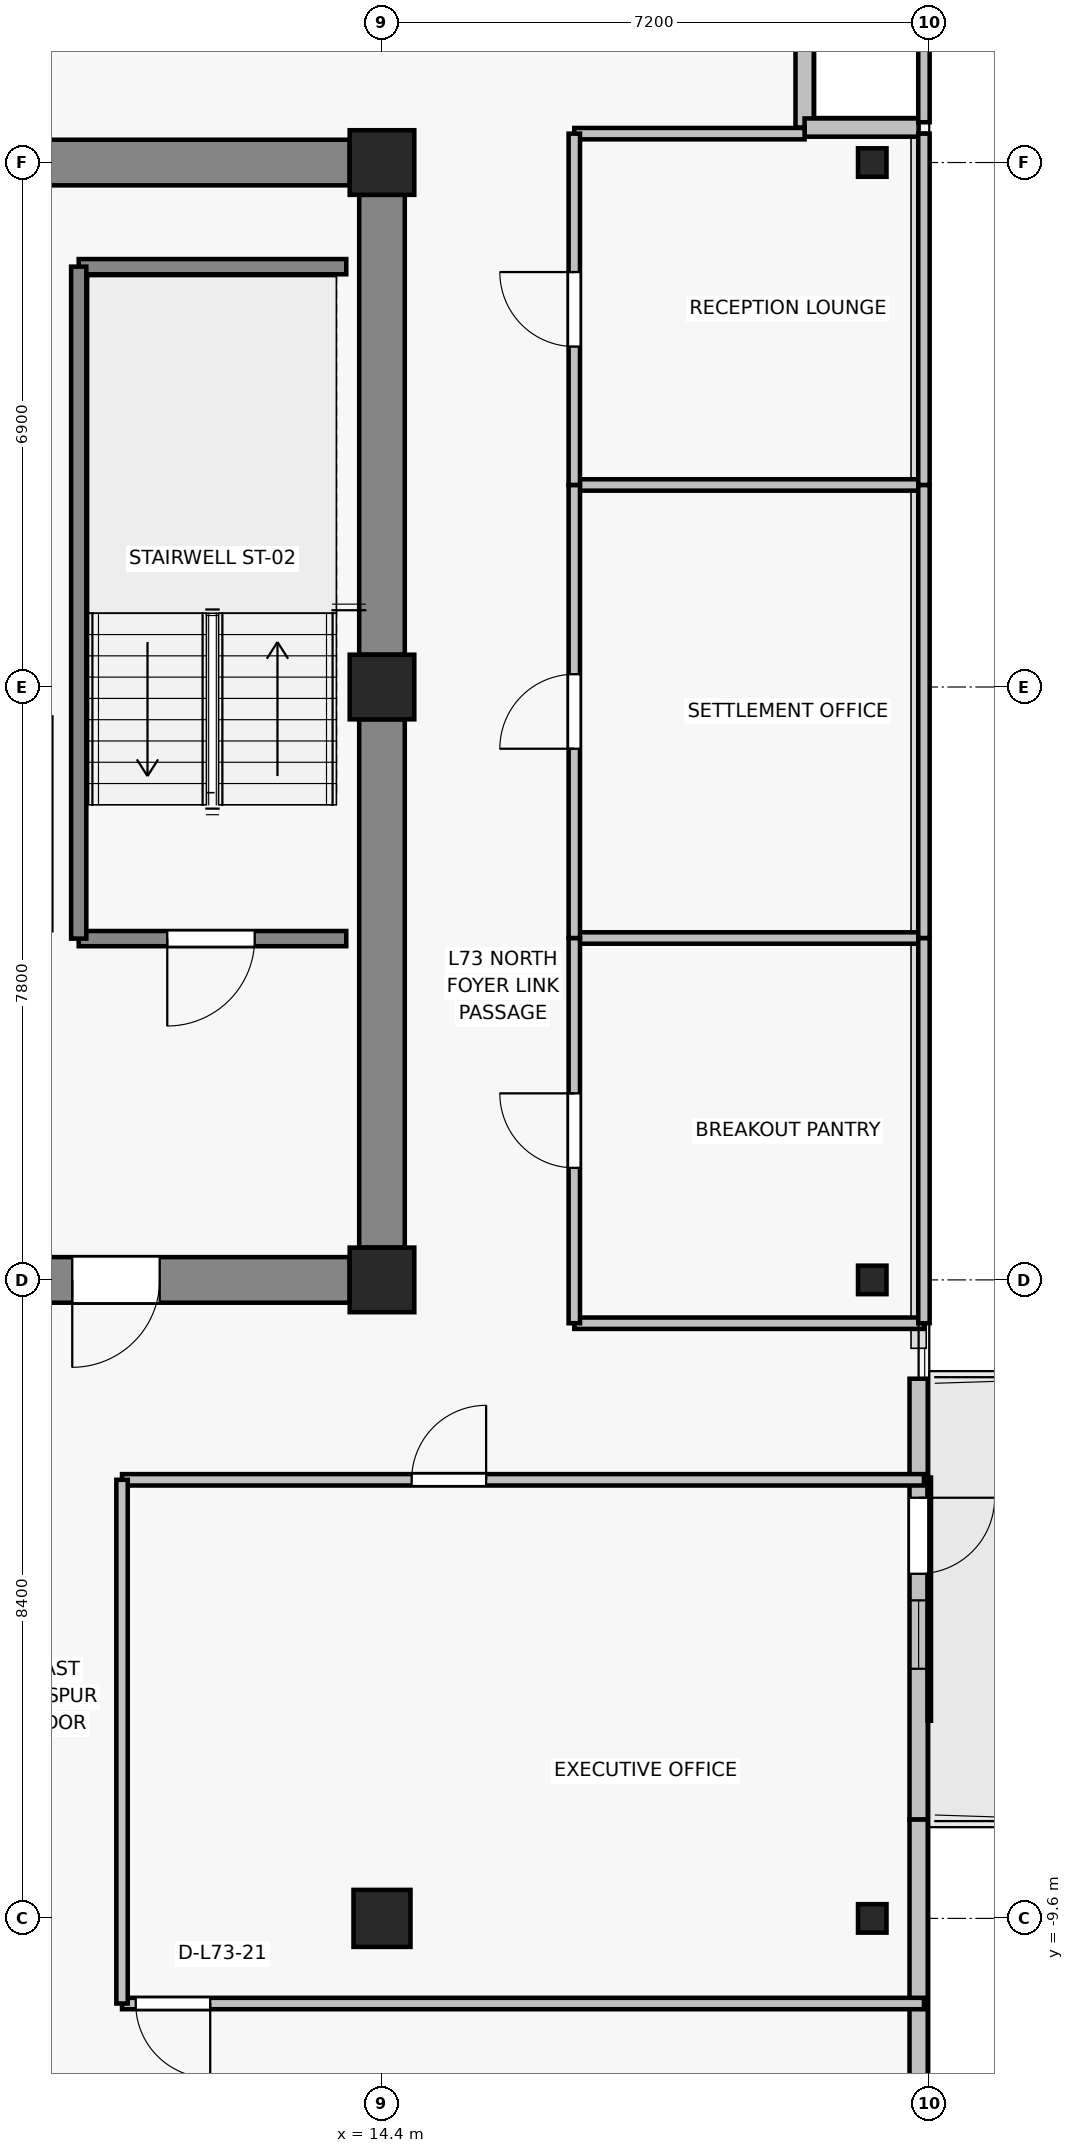
"""IFC4 building model, lengths in metres.
Left out: names, types, materials, properties, quantities, classifications, styles, units other than length and angle.
Written with IfcOpenShell. Run it as: python <this file> out.ifc"""

import sys

from ifc_helpers import new_model, si_unit, direction, frame, frame_2d, origin, origin_2d, place, context, subcontext, project, spatial, rectangle, i_section, extrude, source, transform, mapped, element, fill, save


model = new_model("IFC4")
c1 = context("Model", 3, precision=1e-05, world=origin(), true_north=direction((0.0, 1.0)))
c2 = subcontext(c1, "Body", "Model", "MODEL_VIEW")
j1 = project(units=[si_unit("LENGTHUNIT", "METRE"), si_unit("PLANEANGLEUNIT", "RADIAN")], contexts=[c1])
p1 = place(None, origin())
s1 = spatial("IfcSite", under=j1, at=p1, CompositionType="ELEMENT")
p2 = place(p1, origin())
s2 = spatial("IfcBuilding", under=s1, at=p2, CompositionType="ELEMENT")
p3 = place(p2, frame((0.0, 0.0, 258.4)))
s3 = spatial("IfcBuildingStorey", under=s2, at=p3, CompositionType="ELEMENT", Elevation=258.4)
for number, where, z_axis, x_axis in (
    (1, (14.4, -1.2, 0.0), (0.0, 0.0, 1.0), (1.0, 0.0, 0.0)),
    (2, (14.4, 6.6, 0.0), (0.0, 0.0, 1.0), (1.0, 0.0, 0.0)),
    (3, (14.4, 13.5, 0.0), (0.0, 0.0, 1.0), (1.0, 0.0, 0.0)),
):
    element("IfcColumn", number, at=place(p3, frame(where, z_axis=z_axis, x_axis=x_axis)), inside=s3, PredefinedType="COLUMN", context=c2, shape_type="SweptSolid", body=[
        extrude(rectangle(XDim=0.85, YDim=0.85, at=origin_2d()), origin(), (0.0, 0.0, 1.0), 3.3),
    ])
p4 = place(p3, frame((14.4, -9.6, 0.0), z_axis=(0.0, 0.0, 1.0), x_axis=(1.0, 0.0, 0.0)))
e4 = element("IfcColumn", 4, at=p4, inside=s3, PredefinedType="COLUMN", context=c2, shape_type="SweptSolid", body=[
    extrude(rectangle(XDim=0.75, YDim=0.75, at=origin_2d()), origin(), (0.0, 0.0, 1.0), 3.3),
])
for number, where, z_axis, x_axis in (
    (5, (20.85, -9.6, 0.0), (0.0, 0.0, 1.0), (1.0, 0.0, 0.0)),
    (6, (20.85, -1.2, 0.0), (0.0, 0.0, 1.0), (1.0, 0.0, 0.0)),
    (7, (20.85, 13.5, 0.0), (0.0, 0.0, 1.0), (1.0, 0.0, 0.0)),
):
    element("IfcColumn", number, at=place(p3, frame(where, z_axis=z_axis, x_axis=x_axis)), inside=s3, PredefinedType="COLUMN", context=c2, shape_type="SweptSolid", body=[
        extrude(i_section(OverallWidth=0.375, OverallDepth=0.375, WebThickness=0.017, FlangeThickness=0.027, FilletRadius=0.015, at=origin_2d()), origin(), (0.0, 0.0, 1.0), 3.3),
    ])
p5 = place(p3, frame((7.625, 13.5, 0.0), z_axis=(0.0, 0.0, 1.0), x_axis=(1.0, 0.0, 0.0)))
e8 = element("IfcWall", 8, at=p5, inside=s3, PredefinedType="SHEAR", context=c2, shape_type="SweptSolid", body=[
    extrude(rectangle(XDim=6.35, YDim=0.6, at=frame_2d((3.175, 0.0))), origin(), (0.0, 0.0, 1.0), 3.075),
])
p6 = place(p3, frame((14.4, -0.775, 0.0), z_axis=(0.0, 0.0, 1.0), x_axis=(0.0, 1.0, 0.0)))
e9 = element("IfcWall", 9, at=p6, inside=s3, PredefinedType="SHEAR", context=c2, shape_type="SweptSolid", body=[
    extrude(rectangle(XDim=6.95, YDim=0.6, at=frame_2d((3.475, 0.0))), origin(), (0.0, 0.0, 1.0), 3.075),
])
p7 = place(p3, frame((14.4, 7.025, 0.0), z_axis=(0.0, 0.0, 1.0), x_axis=(0.0, 1.0, 0.0)))
e10 = element("IfcWall", 10, at=p7, inside=s3, PredefinedType="SHEAR", context=c2, shape_type="SweptSolid", body=[
    extrude(rectangle(XDim=6.05, YDim=0.6, at=frame_2d((3.025, 0.0))), origin(), (0.0, 0.0, 1.0), 3.075),
])
p8 = place(p3, frame((13.975, -1.2, 0.0), z_axis=(0.0, 0.0, 1.0), x_axis=(-1.0, 0.0, 0.0)))
e11 = element("IfcWall", 11, at=p8, inside=s3, PredefinedType="SHEAR", context=c2, shape_type="SweptSolid", body=[
    extrude(rectangle(XDim=6.35, YDim=0.6, at=frame_2d((3.175, 0.0))), origin(), (0.0, 0.0, 1.0), 3.075),
])
p9 = place(p8, frame((2.5, 0.0, 0.0)))
e12 = element("IfcOpeningElement", 12, at=p9, cuts=e11, PredefinedType="OPENING", context=c2, shape_type="SweptSolid", body=[
    extrude(rectangle(XDim=1.15, YDim=2.15, at=frame_2d((0.575, 1.075))), frame((0.0, 0.31, 0.0), z_axis=(0.0, -1.0, 0.0), x_axis=(1.0, 0.0, 0.0)), (0.0, 0.0, 1.0), 0.62),
])
p10 = place(p3, frame((21.46, -2.5, 0.0), z_axis=(0.0, 0.0, 1.0), x_axis=(0.0, -1.0, 0.0)))
e13 = element("IfcWall", 13, at=p10, inside=s3, PredefinedType="SOLIDWALL", context=c2, shape_type="SweptSolid", body=[
    extrude(rectangle(XDim=5.8, YDim=0.24, at=frame_2d((2.9, 0.0))), origin(), (0.0, 0.0, 1.0), 3.075),
])
p11 = place(p10, frame((1.566, 0.0, 0.0)))
e14 = element("IfcOpeningElement", 14, at=p11, cuts=e13, PredefinedType="OPENING", context=c2, shape_type="SweptSolid", body=[
    extrude(rectangle(XDim=1.0, YDim=2.2, at=frame_2d((0.5, 1.1))), frame((0.0, 0.13, 0.0), z_axis=(0.0, -1.0, 0.0), x_axis=(1.0, 0.0, 0.0)), (0.0, 0.0, 1.0), 0.26),
])
p12 = place(p10, frame((2.916, 0.0, 0.85)))
e15 = element("IfcOpeningElement", 15, at=p12, cuts=e13, PredefinedType="OPENING", context=c2, shape_type="SweptSolid", body=[
    extrude(rectangle(XDim=0.9, YDim=1.35, at=frame_2d((0.45, 0.675))), frame((0.0, 0.13, 0.0), z_axis=(0.0, -1.0, 0.0), x_axis=(1.0, 0.0, 0.0)), (0.0, 0.0, 1.0), 0.26),
])
for number, where, z_axis, x_axis in (
    (16, (19.96, 13.96, 0.0), (0.0, 0.0, 1.0), (0.0, 1.0, 0.0)),
    (17, (21.46, 13.96, 0.0), (0.0, 0.0, 1.0), (-1.0, 0.0, 0.0)),
):
    element("IfcWall", number, at=place(p3, frame(where, z_axis=z_axis, x_axis=x_axis)), inside=s3, PredefinedType="SOLIDWALL", context=c2, shape_type="SweptSolid", body=[
        extrude(rectangle(XDim=1.5, YDim=0.24, at=frame_2d((0.75, 0.0))), origin(), (0.0, 0.0, 1.0), 3.075),
    ])
p13 = place(p3, frame((21.46, -13.96, 0.0), z_axis=(0.0, 0.0, 1.0), x_axis=(0.0, 1.0, 0.0)))
e18 = element("IfcWall", 18, at=p13, inside=s3, PredefinedType="SOLIDWALL", context=c2, shape_type="SweptSolid", body=[
    extrude(rectangle(XDim=5.66, YDim=0.24, at=frame_2d((2.83, 0.0))), origin(), (0.0, 0.0, 1.0), 3.075),
])
p14 = place(p3, frame((13.93, 3.29, 0.0), z_axis=(0.0, 0.0, 1.0), x_axis=(-1.0, 0.0, 0.0)))
e19 = element("IfcWall", 19, at=p14, inside=s3, PredefinedType="SOLIDWALL", context=c2, shape_type="SweptSolid", body=[
    extrude(rectangle(XDim=3.52, YDim=0.2, at=frame_2d((1.76, 0.0))), origin(), (0.0, 0.0, 1.0), 3.075),
])
p15 = place(p14, frame((1.205, 0.0, 0.0)))
e20 = element("IfcOpeningElement", 20, at=p15, cuts=e19, PredefinedType="OPENING", context=c2, shape_type="SweptSolid", body=[
    extrude(rectangle(XDim=1.15, YDim=2.15, at=frame_2d((0.575, 1.075))), frame((0.0, 0.11, 0.0), z_axis=(0.0, -1.0, 0.0), x_axis=(1.0, 0.0, 0.0)), (0.0, 0.0, 1.0), 0.22),
])
p16 = place(p3, frame((10.41, 12.13, 0.0), z_axis=(0.0, 0.0, 1.0), x_axis=(1.0, 0.0, 0.0)))
e21 = element("IfcWall", 21, at=p16, inside=s3, PredefinedType="SOLIDWALL", context=c2, shape_type="SweptSolid", body=[
    extrude(rectangle(XDim=3.52, YDim=0.2, at=frame_2d((1.76, 0.0))), origin(), (0.0, 0.0, 1.0), 3.075),
])
p17 = place(p3, frame((10.41, 3.29, 0.0), z_axis=(0.0, 0.0, 1.0), x_axis=(0.0, 1.0, 0.0)))
e22 = element("IfcWall", 22, at=p17, inside=s3, PredefinedType="SOLIDWALL", context=c2, shape_type="SweptSolid", body=[
    extrude(rectangle(XDim=8.84, YDim=0.2, at=frame_2d((4.42, 0.0))), origin(), (0.0, 0.0, 1.0), 3.075),
])
p18 = place(p3, frame((21.53, -10.72, 0.0), z_axis=(0.0, 0.0, 1.0), x_axis=(-1.0, 0.0, 0.0)))
e23 = element("IfcWall", 23, at=p18, inside=s3, PredefinedType="PARTITIONING", context=c2, shape_type="SweptSolid", body=[
    extrude(rectangle(XDim=10.55, YDim=0.15, at=frame_2d((5.275, 0.0))), origin(), (0.0, 0.0, 1.0), 2.615),
])
p19 = place(p18, frame((9.39, 0.0, 0.0)))
e24 = element("IfcOpeningElement", 24, at=p19, cuts=e23, PredefinedType="OPENING", context=c2, shape_type="SweptSolid", body=[
    extrude(rectangle(XDim=0.98, YDim=2.15, at=frame_2d((0.49, 1.075))), frame((0.0, 0.085, 0.0), z_axis=(0.0, -1.0, 0.0), x_axis=(1.0, 0.0, 0.0)), (0.0, 0.0, 1.0), 0.17),
])
p20 = place(p3, frame((10.98, -3.83, 0.0), z_axis=(0.0, 0.0, 1.0), x_axis=(1.0, 0.0, 0.0)))
e25 = element("IfcWall", 25, at=p20, inside=s3, PredefinedType="PARTITIONING", context=c2, shape_type="SweptSolid", body=[
    extrude(rectangle(XDim=10.55, YDim=0.15, at=frame_2d((5.275, 0.0))), origin(), (0.0, 0.0, 1.0), 2.615),
])
p21 = place(p20, frame((3.81, 0.0, 0.0)))
e26 = element("IfcOpeningElement", 26, at=p21, cuts=e25, PredefinedType="OPENING", context=c2, shape_type="SweptSolid", body=[
    extrude(rectangle(XDim=0.98, YDim=2.15, at=frame_2d((0.49, 1.075))), frame((0.0, 0.085, 0.0), z_axis=(0.0, -1.0, 0.0), x_axis=(1.0, 0.0, 0.0)), (0.0, 0.0, 1.0), 0.17),
])
p22 = place(p3, frame((10.98, -10.72, 0.0), z_axis=(0.0, 0.0, 1.0), x_axis=(0.0, 1.0, 0.0)))
e27 = element("IfcWall", 27, at=p22, inside=s3, PredefinedType="PARTITIONING", context=c2, shape_type="SweptSolid", body=[
    extrude(rectangle(XDim=6.89, YDim=0.15, at=frame_2d((3.445, 0.0))), origin(), (0.0, 0.0, 1.0), 2.615),
])
for number, where, z_axis, x_axis in (
    (28, (21.53, -1.77, 0.0), (0.0, 0.0, 1.0), (-1.0, 0.0, 0.0)),
    (29, (16.93, 3.298, 0.0), (0.0, 0.0, 1.0), (1.0, 0.0, 0.0)),
):
    element("IfcWall", number, at=place(p3, frame(where, z_axis=z_axis, x_axis=x_axis)), inside=s3, PredefinedType="PARTITIONING", context=c2, shape_type="SweptSolid", body=[
        extrude(rectangle(XDim=4.6, YDim=0.15, at=frame_2d((2.3, 0.0))), origin(), (0.0, 0.0, 1.0), 2.765),
    ])
p23 = place(p3, frame((16.93, -1.77, 0.0), z_axis=(0.0, 0.0, 1.0), x_axis=(0.0, 1.0, 0.0)))
e30 = element("IfcWall", 30, at=p23, inside=s3, PredefinedType="PARTITIONING", context=c2, shape_type="SweptSolid", body=[
    extrude(rectangle(XDim=5.068, YDim=0.15, at=frame_2d((2.534, 0.0))), origin(), (0.0, 0.0, 1.0), 2.615),
])
p24 = place(p23, frame((2.044, 0.0, 0.0)))
e31 = element("IfcOpeningElement", 31, at=p24, cuts=e30, PredefinedType="OPENING", context=c2, shape_type="SweptSolid", body=[
    extrude(rectangle(XDim=0.98, YDim=2.15, at=frame_2d((0.49, 1.075))), frame((0.0, 0.085, 0.0), z_axis=(0.0, -1.0, 0.0), x_axis=(1.0, 0.0, 0.0)), (0.0, 0.0, 1.0), 0.17),
])
p25 = place(p3, frame((21.53, 3.298, 0.0), z_axis=(0.0, 0.0, 1.0), x_axis=(0.0, -1.0, 0.0)))
e32 = element("IfcWall", 32, at=p25, inside=s3, PredefinedType="PARTITIONING", context=c2, shape_type="SweptSolid", body=[
    extrude(rectangle(XDim=5.068, YDim=0.15, at=frame_2d((2.534, 0.0))), origin(), (0.0, 0.0, 1.0), 3.075),
])
p26 = place(p3, frame((16.93, 9.258, 0.0), z_axis=(0.0, 0.0, 1.0), x_axis=(1.0, 0.0, 0.0)))
e33 = element("IfcWall", 33, at=p26, inside=s3, PredefinedType="PARTITIONING", context=c2, shape_type="SweptSolid", body=[
    extrude(rectangle(XDim=4.6, YDim=0.15, at=frame_2d((2.3, 0.0))), origin(), (0.0, 0.0, 1.0), 2.765),
])
p27 = place(p3, frame((16.93, 3.298, 0.0), z_axis=(0.0, 0.0, 1.0), x_axis=(0.0, 1.0, 0.0)))
e34 = element("IfcWall", 34, at=p27, inside=s3, PredefinedType="PARTITIONING", context=c2, shape_type="SweptSolid", body=[
    extrude(rectangle(XDim=5.96, YDim=0.15, at=frame_2d((2.98, 0.0))), origin(), (0.0, 0.0, 1.0), 3.075),
])
p28 = place(p27, frame((2.49, 0.0, 0.0)))
e35 = element("IfcOpeningElement", 35, at=p28, cuts=e34, PredefinedType="OPENING", context=c2, shape_type="SweptSolid", body=[
    extrude(rectangle(XDim=0.98, YDim=2.15, at=frame_2d((0.49, 1.075))), frame((0.0, 0.085, 0.0), z_axis=(0.0, -1.0, 0.0), x_axis=(1.0, 0.0, 0.0)), (0.0, 0.0, 1.0), 0.17),
])
p29 = place(p3, frame((21.53, 9.258, 0.0), z_axis=(0.0, 0.0, 1.0), x_axis=(0.0, -1.0, 0.0)))
e36 = element("IfcWall", 36, at=p29, inside=s3, PredefinedType="PARTITIONING", context=c2, shape_type="SweptSolid", body=[
    extrude(rectangle(XDim=5.96, YDim=0.15, at=frame_2d((2.98, 0.0))), origin(), (0.0, 0.0, 1.0), 3.075),
])
p30 = place(p3, frame((16.93, 13.88, 0.0), z_axis=(0.0, 0.0, 1.0), x_axis=(1.0, 0.0, 0.0)))
e37 = element("IfcWall", 37, at=p30, inside=s3, PredefinedType="PARTITIONING", context=c2, shape_type="SweptSolid", body=[
    extrude(rectangle(XDim=3.03, YDim=0.15, at=frame_2d((1.515, 0.0))), origin(), (0.0, 0.0, 1.0), 3.075),
])
p31 = place(p3, frame((16.93, 9.258, 0.0), z_axis=(0.0, 0.0, 1.0), x_axis=(0.0, 1.0, 0.0)))
e38 = element("IfcWall", 38, at=p31, inside=s3, PredefinedType="PARTITIONING", context=c2, shape_type="SweptSolid", body=[
    extrude(rectangle(XDim=4.622, YDim=0.15, at=frame_2d((2.311, 0.0))), origin(), (0.0, 0.0, 1.0), 2.615),
])
p32 = place(p31, frame((1.821, 0.0, 0.0)))
e39 = element("IfcOpeningElement", 39, at=p32, cuts=e38, PredefinedType="OPENING", context=c2, shape_type="SweptSolid", body=[
    extrude(rectangle(XDim=0.98, YDim=2.15, at=frame_2d((0.49, 1.075))), frame((0.0, 0.085, 0.0), z_axis=(0.0, -1.0, 0.0), x_axis=(1.0, 0.0, 0.0)), (0.0, 0.0, 1.0), 0.17),
])
p33 = place(p3, frame((21.53, 13.88, 0.0), z_axis=(0.0, 0.0, 1.0), x_axis=(0.0, -1.0, 0.0)))
e40 = element("IfcWall", 40, at=p33, inside=s3, PredefinedType="PARTITIONING", context=c2, shape_type="SweptSolid", body=[
    extrude(rectangle(XDim=4.622, YDim=0.15, at=frame_2d((2.311, 0.0))), origin(), (0.0, 0.0, 1.0), 3.075),
])
p34 = place(p3, frame((21.53, 17.03, 0.0), z_axis=(0.0, 0.0, 1.0), x_axis=(0.0, -1.0, 0.0)))
e41 = element("IfcWall", 41, at=p34, inside=s3, PredefinedType="PARTITIONING", context=c2, shape_type="SweptSolid", body=[
    extrude(rectangle(XDim=3.0, YDim=0.15, at=frame_2d((1.5, 0.0))), origin(), (0.0, 0.0, 1.0), 3.075),
])
m1 = source(origin(), c2, "Body", "SweptSolid", [
    extrude(rectangle(XDim=1.0, YDim=2.2, at=frame_2d((0.5, 1.1))), frame((0.0, 0.025, 0.0), z_axis=(0.0, -1.0, 0.0), x_axis=(1.0, 0.0, 0.0)), (0.0, 0.0, 1.0), 0.05),
])
p35 = place(p11, origin())
e42 = element("IfcDoor", 42, at=p35, inside=s3, OperationType="SINGLE_SWING_LEFT", PredefinedType="DOOR", context=c2, shape_type="MappedRepresentation", body=[
    mapped(m1, transform((0.0, 0.0, 0.0), x_axis=(1.0, 0.0, 0.0), y_axis=(0.0, 1.0, 0.0), z_axis=(0.0, 0.0, 1.0), scale=1.0)),
])
fill(e14, e42)
m2 = source(origin(), c2, "Body", "SweptSolid", [
    extrude(rectangle(XDim=0.9, YDim=1.35, at=frame_2d((0.45, 0.675))), frame((0.0, 0.03, 0.0), z_axis=(0.0, -1.0, 0.0), x_axis=(1.0, 0.0, 0.0)), (0.0, 0.0, 1.0), 0.06),
])
p36 = place(p12, origin())
e43 = element("IfcWindow", 43, at=p36, inside=s3, PartitioningType="SINGLE_PANEL", PredefinedType="WINDOW", context=c2, shape_type="MappedRepresentation", body=[
    mapped(m2, transform((0.0, 0.0, 0.0), x_axis=(1.0, 0.0, 0.0), y_axis=(0.0, 1.0, 0.0), z_axis=(0.0, 0.0, 1.0), scale=1.0)),
])
fill(e15, e43)
m3 = source(origin(), c2, "Body", "SweptSolid", [
    extrude(rectangle(XDim=1.15, YDim=2.15, at=frame_2d((0.575, 1.075))), frame((0.0, 0.025, 0.0), z_axis=(0.0, -1.0, 0.0), x_axis=(1.0, 0.0, 0.0)), (0.0, 0.0, 1.0), 0.05),
])
p37 = place(p15, origin())
e44 = element("IfcDoor", 44, at=p37, inside=s3, OperationType="SINGLE_SWING_RIGHT", PredefinedType="DOOR", context=c2, shape_type="MappedRepresentation", body=[
    mapped(m3, transform((0.0, 0.0, 0.0), x_axis=(1.0, 0.0, 0.0), y_axis=(0.0, 1.0, 0.0), z_axis=(0.0, 0.0, 1.0), scale=1.0)),
])
fill(e20, e44)
p38 = place(p9, origin())
e45 = element("IfcDoor", 45, at=p38, inside=s3, OperationType="SINGLE_SWING_RIGHT", PredefinedType="DOOR", context=c2, shape_type="MappedRepresentation", body=[
    mapped(m3, transform((0.0, 0.0, 0.0), x_axis=(1.0, 0.0, 0.0), y_axis=(0.0, 1.0, 0.0), z_axis=(0.0, 0.0, 1.0), scale=1.0)),
])
fill(e12, e45)
m4 = source(origin(), c2, "Body", "SweptSolid", [
    extrude(rectangle(XDim=0.98, YDim=2.15, at=frame_2d((0.49, 1.075))), frame((0.0, 0.025, 0.0), z_axis=(0.0, -1.0, 0.0), x_axis=(1.0, 0.0, 0.0)), (0.0, 0.0, 1.0), 0.05),
])
p39 = place(p21, origin())
e46 = element("IfcDoor", 46, at=p39, inside=s3, OperationType="SINGLE_SWING_RIGHT", PredefinedType="DOOR", context=c2, shape_type="MappedRepresentation", body=[
    mapped(m4, transform((0.0, 0.0, 0.0), x_axis=(1.0, 0.0, 0.0), y_axis=(0.0, 1.0, 0.0), z_axis=(0.0, 0.0, 1.0), scale=1.0)),
])
fill(e26, e46)
p40 = place(p19, origin())
e47 = element("IfcDoor", 47, at=p40, inside=s3, OperationType="SINGLE_SWING_LEFT", PredefinedType="DOOR", context=c2, shape_type="MappedRepresentation", body=[
    mapped(m4, transform((0.0, 0.0, 0.0), x_axis=(1.0, 0.0, 0.0), y_axis=(0.0, 1.0, 0.0), z_axis=(0.0, 0.0, 1.0), scale=1.0)),
])
fill(e24, e47)
p41 = place(p24, origin())
e48 = element("IfcDoor", 48, at=p41, inside=s3, OperationType="SINGLE_SWING_RIGHT", PredefinedType="DOOR", context=c2, shape_type="MappedRepresentation", body=[
    mapped(m4, transform((0.0, 0.0, 0.0), x_axis=(1.0, 0.0, 0.0), y_axis=(0.0, 1.0, 0.0), z_axis=(0.0, 0.0, 1.0), scale=1.0)),
])
fill(e31, e48)
p42 = place(p28, origin())
e49 = element("IfcDoor", 49, at=p42, inside=s3, OperationType="SINGLE_SWING_LEFT", PredefinedType="DOOR", context=c2, shape_type="MappedRepresentation", body=[
    mapped(m4, transform((0.0, 0.0, 0.0), x_axis=(1.0, 0.0, 0.0), y_axis=(0.0, 1.0, 0.0), z_axis=(0.0, 0.0, 1.0), scale=1.0)),
])
fill(e35, e49)
p43 = place(p32, origin())
e50 = element("IfcDoor", 50, at=p43, inside=s3, OperationType="SINGLE_SWING_RIGHT", PredefinedType="DOOR", context=c2, shape_type="MappedRepresentation", body=[
    mapped(m4, transform((0.0, 0.0, 0.0), x_axis=(1.0, 0.0, 0.0), y_axis=(0.0, 1.0, 0.0), z_axis=(0.0, 0.0, 1.0), scale=1.0)),
])
fill(e39, e50)
save(model, sys.argv[1])
